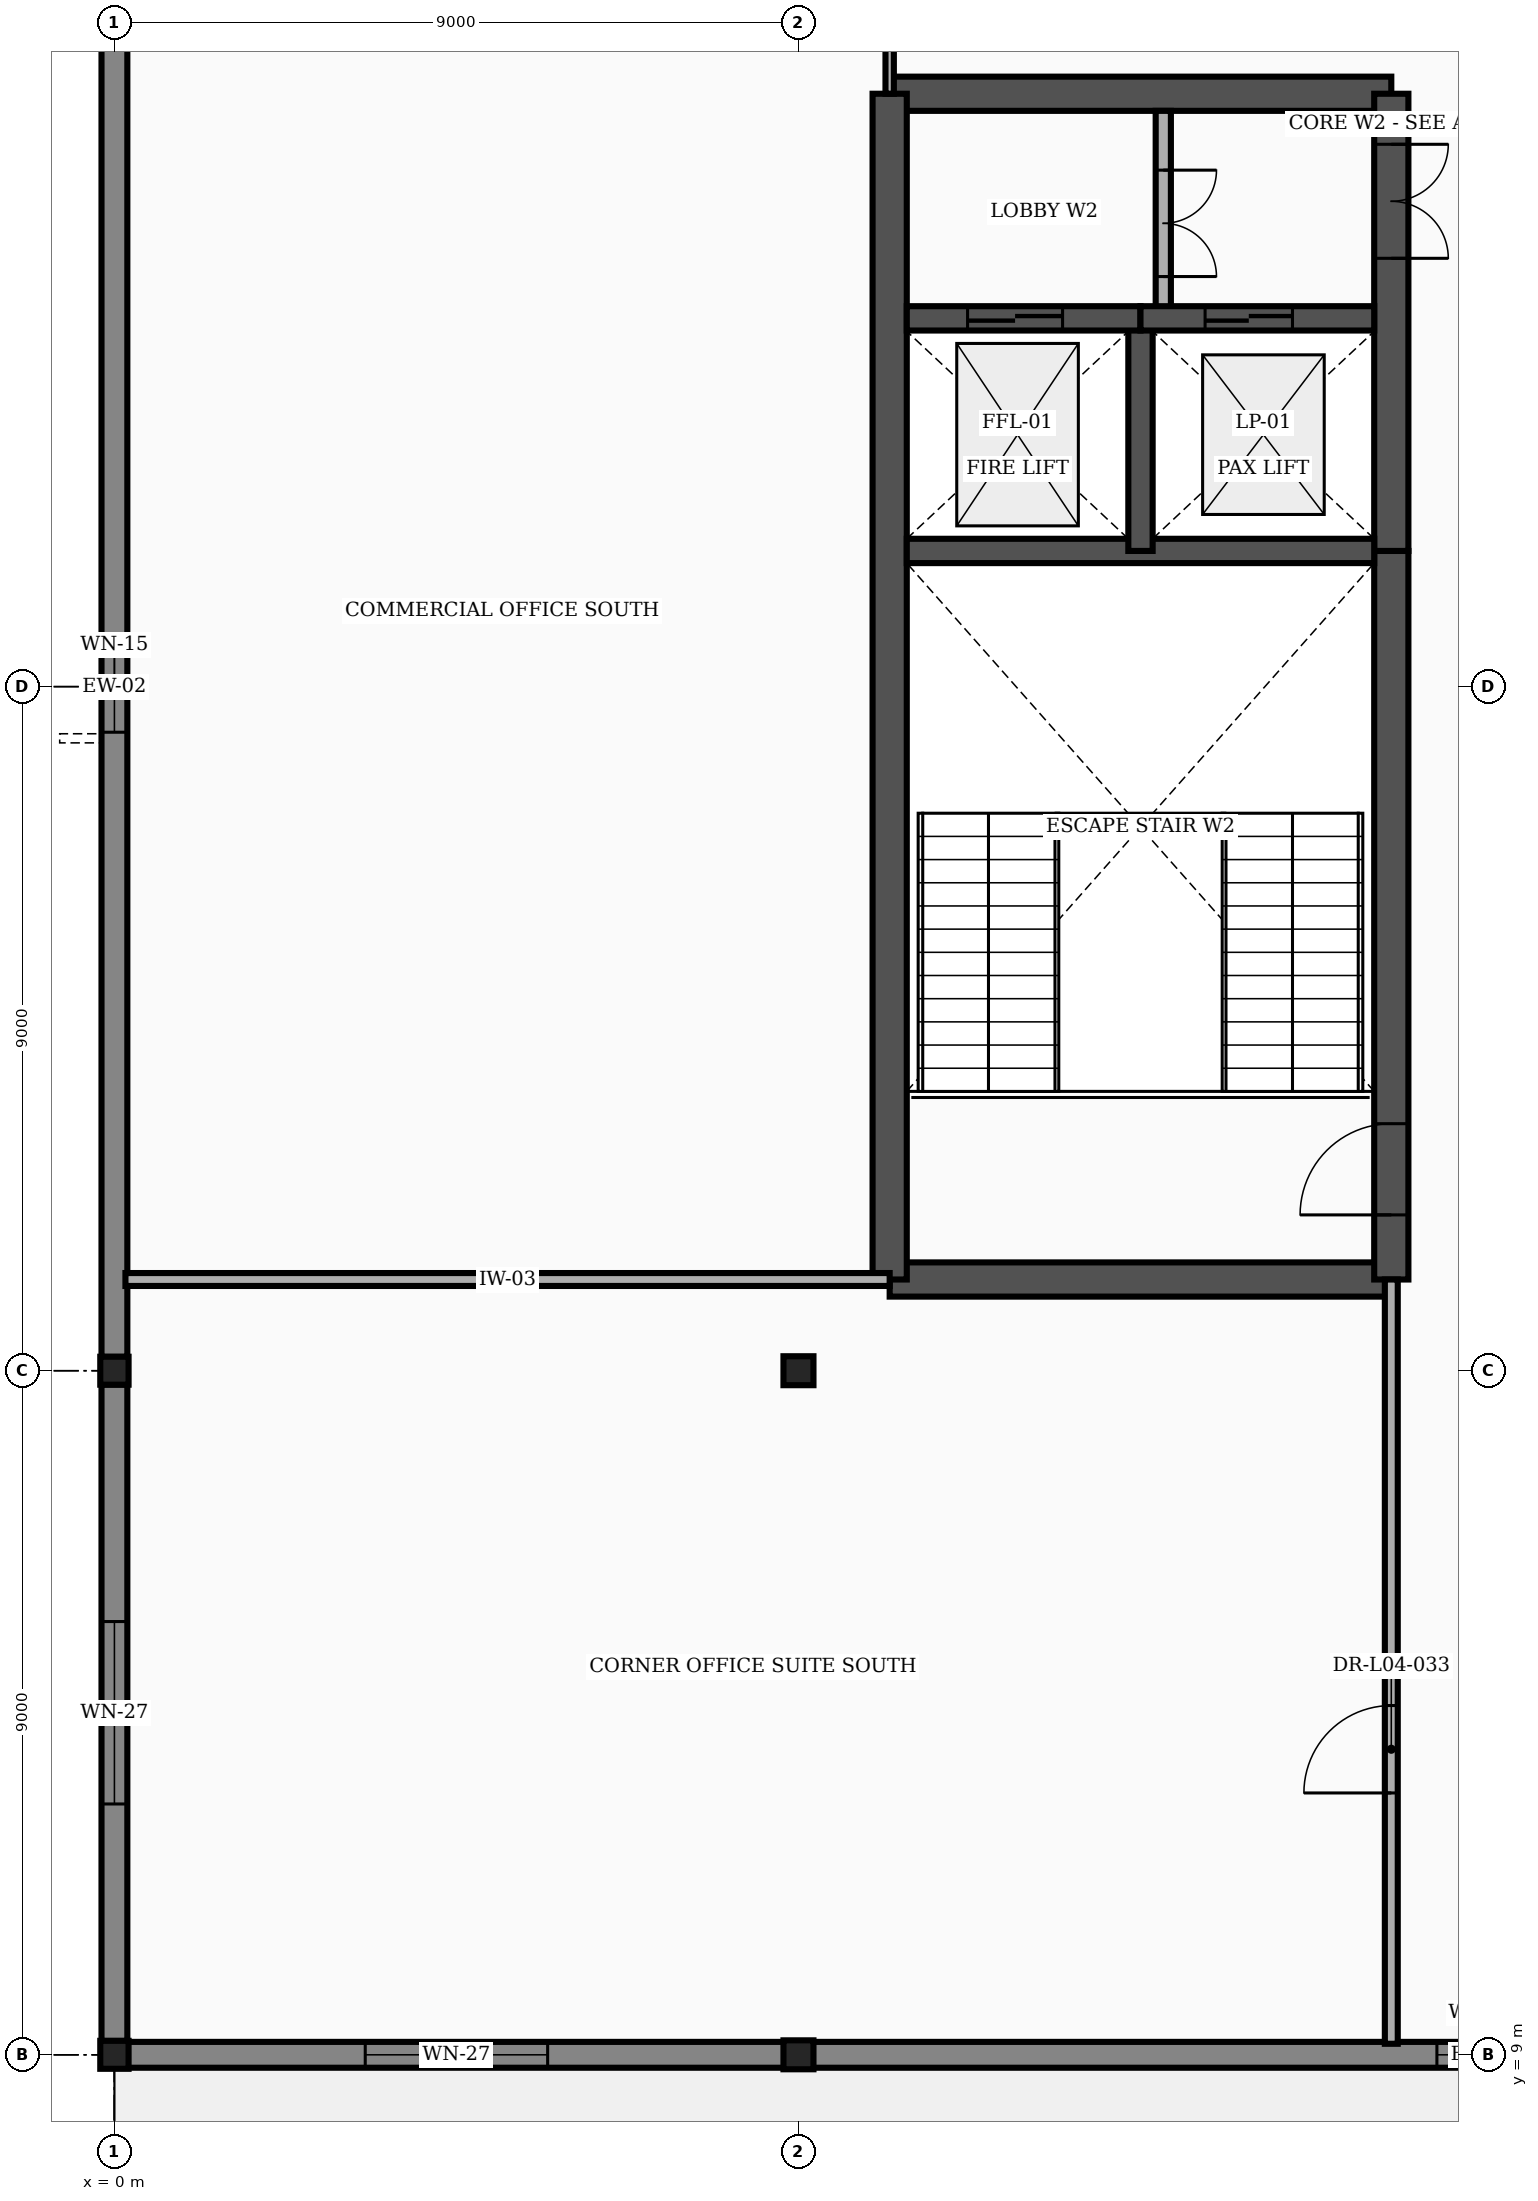
"""IFC4 building model, lengths in metres.
Left out: names, types, materials, properties, quantities, classifications, styles, units other than length and angle.
Written with IfcOpenShell. Run it as: python <this file> out.ifc"""

import sys

from ifc_helpers import new_model, si_unit, direction, frame, frame_2d, origin, origin_2d, place, context, subcontext, project, spatial, rectangle, i_section, extrude, element, fill, save


model = new_model("IFC4")
c1 = context("Model", 3, precision=1e-05, world=origin(), true_north=direction((0.0, 1.0)))
c2 = subcontext(c1, "Body", "Model", "MODEL_VIEW")
j1 = project(units=[si_unit("LENGTHUNIT", "METRE"), si_unit("PLANEANGLEUNIT", "RADIAN")], contexts=[c1])
p1 = place(None, origin())
s1 = spatial("IfcSite", under=j1, at=p1, CompositionType="ELEMENT")
p2 = place(p1, origin())
s2 = spatial("IfcBuilding", under=s1, at=p2, CompositionType="ELEMENT")
p3 = place(p2, frame((0.0, 0.0, 21.6)))
s3 = spatial("IfcBuildingStorey", under=s2, at=p3, CompositionType="ELEMENT", Elevation=21.6)
for number, where, z_axis, x_axis in (
    (1, (0.0, 9.0, 0.0), (0.0, 0.0, 1.0), (1.0, 0.0, 0.0)),
    (2, (0.0, 18.0, 0.0), (0.0, 0.0, 1.0), (1.0, 0.0, 0.0)),
):
    element("IfcColumn", number, at=place(p3, frame(where, z_axis=z_axis, x_axis=x_axis)), inside=s3, PredefinedType="COLUMN", context=c2, shape_type="SweptSolid", body=[
        extrude(i_section(OverallWidth=0.373, OverallDepth=0.368, WebThickness=0.014, FlangeThickness=0.024, FilletRadius=0.015, at=origin_2d()), origin(), (0.0, 0.0, 1.0), 3.9),
    ])
for number, where, z_axis, x_axis in (
    (3, (9.0, 9.0, 0.0), (0.0, 0.0, 1.0), (1.0, 0.0, 0.0)),
    (4, (9.0, 18.0, 0.0), (0.0, 0.0, 1.0), (1.0, 0.0, 0.0)),
):
    element("IfcColumn", number, at=place(p3, frame(where, z_axis=z_axis, x_axis=x_axis)), inside=s3, PredefinedType="COLUMN", context=c2, shape_type="SweptSolid", body=[
        extrude(i_section(OverallWidth=0.395, OverallDepth=0.381, WebThickness=0.018, FlangeThickness=0.03, at=origin_2d()), origin(), (0.0, 0.0, 1.0), 3.9),
    ])
p4 = place(p3, frame((0.01, 9.0, 0.0), z_axis=(0.0, 0.0, 1.0), x_axis=(1.0, 0.0, 0.0)))
e5 = element("IfcWall", 5, at=p4, inside=s3, PredefinedType="STANDARD", context=c2, shape_type="SweptSolid", body=[
    extrude(rectangle(XDim=8.98, YDim=0.34, at=frame_2d((4.49, 0.0))), origin(), (0.0, 0.0, 1.0), 3.585),
])
p5 = place(p4, frame((3.29, 0.0, 0.7)))
e6 = element("IfcOpeningElement", 6, at=p5, cuts=e5, PredefinedType="OPENING", context=c2, shape_type="SweptSolid", body=[
    extrude(rectangle(XDim=2.4, YDim=1.95, at=frame_2d((1.2, 0.975))), frame((0.0, 0.182, 0.0), z_axis=(0.0, -1.0, 0.0), x_axis=(1.0, 0.0, 0.0)), (0.0, 0.0, 1.0), 0.364),
])
p6 = place(p3, frame((9.01, 9.0, 0.0), z_axis=(0.0, 0.0, 1.0), x_axis=(1.0, 0.0, 0.0)))
e7 = element("IfcWall", 7, at=p6, inside=s3, PredefinedType="STANDARD", context=c2, shape_type="SweptSolid", body=[
    extrude(rectangle(XDim=17.98, YDim=0.34, at=frame_2d((8.99, 0.0))), origin(), (0.0, 0.0, 1.0), 3.245),
])
p7 = place(p6, frame((8.39, 0.0, 0.7)))
e8 = element("IfcOpeningElement", 8, at=p7, cuts=e7, PredefinedType="OPENING", context=c2, shape_type="SweptSolid", body=[
    extrude(rectangle(XDim=1.2, YDim=1.95, at=frame_2d((0.6, 0.975))), frame((0.0, 0.182, 0.0), z_axis=(0.0, -1.0, 0.0), x_axis=(1.0, 0.0, 0.0)), (0.0, 0.0, 1.0), 0.364),
])
p8 = place(p3, frame((0.0, 9.182, 0.0), z_axis=(0.0, 0.0, 1.0), x_axis=(0.0, 1.0, 0.0)))
e9 = element("IfcWall", 9, at=p8, inside=s3, PredefinedType="STANDARD", context=c2, shape_type="SweptSolid", body=[
    extrude(rectangle(XDim=8.636, YDim=0.34, at=frame_2d((4.318, 0.0))), origin(), (0.0, 0.0, 1.0), 3.585),
])
p9 = place(p8, frame((3.118, 0.0, 0.7)))
e10 = element("IfcOpeningElement", 10, at=p9, cuts=e9, PredefinedType="OPENING", context=c2, shape_type="SweptSolid", body=[
    extrude(rectangle(XDim=2.4, YDim=1.95, at=frame_2d((1.2, 0.975))), frame((0.0, 0.182, 0.0), z_axis=(0.0, -1.0, 0.0), x_axis=(1.0, 0.0, 0.0)), (0.0, 0.0, 1.0), 0.364),
])
p10 = place(p3, frame((0.0, 18.182, 0.0), z_axis=(0.0, 0.0, 1.0), x_axis=(0.0, 1.0, 0.0)))
e11 = element("IfcWall", 11, at=p10, inside=s3, PredefinedType="STANDARD", context=c2, shape_type="SweptSolid", body=[
    extrude(rectangle(XDim=17.636, YDim=0.34, at=frame_2d((8.818, 0.0))), origin(), (0.0, 0.0, 1.0), 2.973),
])
p11 = place(p10, frame((8.218, 0.0, 0.7)))
e12 = element("IfcOpeningElement", 12, at=p11, cuts=e11, PredefinedType="OPENING", context=c2, shape_type="SweptSolid", body=[
    extrude(rectangle(XDim=1.2, YDim=1.95, at=frame_2d((0.6, 0.975))), frame((0.0, 0.182, 0.0), z_axis=(0.0, -1.0, 0.0), x_axis=(1.0, 0.0, 0.0)), (0.0, 0.0, 1.0), 0.364),
])
for number, where, z_axis, x_axis in (
    (13, (10.2, 19.2, 0.0), (0.0, 0.0, 1.0), (1.0, 0.0, 0.0)),
    (14, (10.2, 34.8, 0.0), (0.0, 0.0, 1.0), (1.0, 0.0, 0.0)),
):
    element("IfcWall", number, at=place(p3, frame(where, z_axis=z_axis, x_axis=x_axis)), inside=s3, PredefinedType="SHEAR", context=c2, shape_type="SweptSolid", body=[
        extrude(rectangle(XDim=6.6, YDim=0.45, at=frame_2d((3.3, 0.0))), origin(), (0.0, 0.0, 1.0), 3.585),
    ])
p12 = place(p3, frame((10.2, 19.2, 0.0), z_axis=(0.0, 0.0, 1.0), x_axis=(0.0, 1.0, 0.0)))
e15 = element("IfcWall", 15, at=p12, inside=s3, PredefinedType="SHEAR", context=c2, shape_type="SweptSolid", body=[
    extrude(rectangle(XDim=15.6, YDim=0.45, at=frame_2d((7.8, 0.0))), origin(), (0.0, 0.0, 1.0), 3.585),
])
p13 = place(p3, frame((16.8, 19.2, 0.0), z_axis=(0.0, 0.0, 1.0), x_axis=(0.0, 1.0, 0.0)))
e16 = element("IfcWall", 16, at=p13, inside=s3, PredefinedType="SHEAR", context=c2, shape_type="SweptSolid", body=[
    extrude(rectangle(XDim=9.585, YDim=0.45, at=frame_2d((4.792, 0.0))), origin(), (0.0, 0.0, 1.0), 3.585),
])
p14 = place(p13, frame((0.85, 0.0, 0.0)))
e17 = element("IfcOpeningElement", 17, at=p14, cuts=e16, PredefinedType="OPENING", context=c2, shape_type="SweptSolid", body=[
    extrude(rectangle(XDim=1.2, YDim=2.2, at=frame_2d((0.6, 1.1))), frame((0.0, 0.237, 0.0), z_axis=(0.0, -1.0, 0.0), x_axis=(1.0, 0.0, 0.0)), (0.0, 0.0, 1.0), 0.474),
])
p15 = place(p3, frame((16.8, 28.785, 0.0), z_axis=(0.0, 0.0, 1.0), x_axis=(0.0, 1.0, 0.0)))
e18 = element("IfcWall", 18, at=p15, inside=s3, PredefinedType="SHEAR", context=c2, shape_type="SweptSolid", body=[
    extrude(rectangle(XDim=6.015, YDim=0.45, at=frame_2d((3.008, 0.0))), origin(), (0.0, 0.0, 1.0), 3.585),
])
p16 = place(p15, frame((3.85, 0.0, 0.0)))
e19 = element("IfcOpeningElement", 19, at=p16, cuts=e18, PredefinedType="OPENING", context=c2, shape_type="SweptSolid", body=[
    extrude(rectangle(XDim=1.5, YDim=2.2, at=frame_2d((0.75, 1.1))), frame((0.0, 0.237, 0.0), z_axis=(0.0, -1.0, 0.0), x_axis=(1.0, 0.0, 0.0)), (0.0, 0.0, 1.0), 0.474),
])
p17 = place(p3, frame((10.425, 28.785, 0.0), z_axis=(0.0, 0.0, 1.0), x_axis=(1.0, 0.0, 0.0)))
e20 = element("IfcWall", 20, at=p17, inside=s3, PredefinedType="SHEAR", context=c2, shape_type="SweptSolid", body=[
    extrude(rectangle(XDim=6.15, YDim=0.32, at=frame_2d((3.075, 0.0))), origin(), (0.0, 0.0, 1.0), 3.585),
])
p18 = place(p3, frame((13.5, 28.785, 0.0), z_axis=(0.0, 0.0, 1.0), x_axis=(0.0, 1.0, 0.0)))
e21 = element("IfcWall", 21, at=p18, inside=s3, PredefinedType="SHEAR", context=c2, shape_type="SweptSolid", body=[
    extrude(rectangle(XDim=3.06, YDim=0.32, at=frame_2d((1.53, 0.0))), origin(), (0.0, 0.0, 1.0), 3.585),
])
p19 = place(p3, frame((13.8, 31.845, 0.0), z_axis=(0.0, 0.0, 1.0), x_axis=(0.0, 1.0, 0.0)))
e22 = element("IfcWall", 22, at=p19, inside=s3, PredefinedType="PARTITIONING", context=c2, shape_type="SweptSolid", body=[
    extrude(rectangle(XDim=2.73, YDim=0.2, at=frame_2d((1.365, 0.0))), origin(), (0.0, 0.0, 1.0), 3.585),
])
p20 = place(p19, frame((0.55, 0.0, 0.0)))
e23 = element("IfcOpeningElement", 23, at=p20, cuts=e22, PredefinedType="OPENING", context=c2, shape_type="SweptSolid", body=[
    extrude(rectangle(XDim=1.4, YDim=2.25, at=frame_2d((0.7, 1.125))), frame((0.0, 0.112, 0.0), z_axis=(0.0, -1.0, 0.0), x_axis=(1.0, 0.0, 0.0)), (0.0, 0.0, 1.0), 0.224),
])
p21 = place(p3, frame((10.425, 31.845, 0.0), z_axis=(0.0, 0.0, 1.0), x_axis=(1.0, 0.0, 0.0)))
e24 = element("IfcWall", 24, at=p21, inside=s3, PredefinedType="SHEAR", context=c2, shape_type="SweptSolid", body=[
    extrude(rectangle(XDim=3.075, YDim=0.32, at=frame_2d((1.538, 0.0))), origin(), (0.0, 0.0, 1.0), 3.585),
])
p22 = place(p21, frame((0.8, 0.0, 0.0)))
e25 = element("IfcOpeningElement", 25, at=p22, cuts=e24, PredefinedType="OPENING", context=c2, shape_type="SweptSolid", body=[
    extrude(rectangle(XDim=1.25, YDim=2.25, at=frame_2d((0.625, 1.125))), frame((0.0, 0.172, 0.0), z_axis=(0.0, -1.0, 0.0), x_axis=(1.0, 0.0, 0.0)), (0.0, 0.0, 1.0), 0.344),
])
p23 = place(p3, frame((13.5, 31.845, 0.0), z_axis=(0.0, 0.0, 1.0), x_axis=(1.0, 0.0, 0.0)))
e26 = element("IfcWall", 26, at=p23, inside=s3, PredefinedType="SHEAR", context=c2, shape_type="SweptSolid", body=[
    extrude(rectangle(XDim=3.075, YDim=0.32, at=frame_2d((1.538, 0.0))), origin(), (0.0, 0.0, 1.0), 3.585),
])
p24 = place(p23, frame((0.85, 0.0, 0.0)))
e27 = element("IfcOpeningElement", 27, at=p24, cuts=e26, PredefinedType="OPENING", context=c2, shape_type="SweptSolid", body=[
    extrude(rectangle(XDim=1.15, YDim=2.2, at=frame_2d((0.575, 1.1))), frame((0.0, 0.172, 0.0), z_axis=(0.0, -1.0, 0.0), x_axis=(1.0, 0.0, 0.0)), (0.0, 0.0, 1.0), 0.344),
])
p25 = place(p3, frame((10.2, 34.8, 0.0), z_axis=(0.0, 0.0, 1.0), x_axis=(0.0, 1.0, 0.0)))
e28 = element("IfcWall", 28, at=p25, inside=s3, PredefinedType="PARTITIONING", context=c2, shape_type="SweptSolid", body=[
    extrude(rectangle(XDim=2.0, YDim=0.11, at=frame_2d((1.0, 0.0))), origin(), (0.0, 0.0, 1.0), 3.585),
])
p26 = place(p3, frame((0.145, 19.2, 0.0), z_axis=(0.0, 0.0, 1.0), x_axis=(1.0, 0.0, 0.0)))
e29 = element("IfcWall", 29, at=p26, inside=s3, PredefinedType="PARTITIONING", context=c2, shape_type="SweptSolid", body=[
    extrude(rectangle(XDim=10.055, YDim=0.17, at=frame_2d((5.027, 0.0))), origin(), (0.0, 0.0, 1.0), 3.585),
])
p27 = place(p3, frame((16.8, 9.145, 0.0), z_axis=(0.0, 0.0, 1.0), x_axis=(0.0, 1.0, 0.0)))
e30 = element("IfcWall", 30, at=p27, inside=s3, PredefinedType="PARTITIONING", context=c2, shape_type="SweptSolid", body=[
    extrude(rectangle(XDim=10.055, YDim=0.17, at=frame_2d((5.027, 0.0))), origin(), (0.0, 0.0, 1.0), 3.585),
])
p28 = place(p27, frame((3.3, 0.0, 0.0)))
e31 = element("IfcOpeningElement", 31, at=p28, cuts=e30, PredefinedType="OPENING", context=c2, shape_type="SweptSolid", body=[
    extrude(rectangle(XDim=1.15, YDim=2.15, at=frame_2d((0.575, 1.075))), frame((0.0, 0.097, 0.0), z_axis=(0.0, -1.0, 0.0), x_axis=(1.0, 0.0, 0.0)), (0.0, 0.0, 1.0), 0.194),
])
p29 = place(p5, origin())
e32 = element("IfcWindow", 32, at=p29, inside=s3, PartitioningType="SINGLE_PANEL", PredefinedType="WINDOW", context=c2, shape_type="SweptSolid", body=[
    extrude(rectangle(XDim=2.4, YDim=1.95, at=frame_2d((1.2, 0.975))), frame((0.0, 0.03, 0.0), z_axis=(0.0, -1.0, 0.0), x_axis=(1.0, 0.0, 0.0)), (0.0, 0.0, 1.0), 0.06),
])
fill(e6, e32)
p30 = place(p7, origin())
e33 = element("IfcWindow", 33, at=p30, inside=s3, PartitioningType="SINGLE_PANEL", PredefinedType="WINDOW", context=c2, shape_type="SweptSolid", body=[
    extrude(rectangle(XDim=1.2, YDim=1.95, at=frame_2d((0.6, 0.975))), frame((0.0, 0.03, 0.0), z_axis=(0.0, -1.0, 0.0), x_axis=(1.0, 0.0, 0.0)), (0.0, 0.0, 1.0), 0.06),
])
fill(e8, e33)
p31 = place(p9, origin())
e34 = element("IfcWindow", 34, at=p31, inside=s3, PartitioningType="SINGLE_PANEL", PredefinedType="WINDOW", context=c2, shape_type="SweptSolid", body=[
    extrude(rectangle(XDim=2.4, YDim=1.95, at=frame_2d((1.2, 0.975))), frame((0.0, 0.03, 0.0), z_axis=(0.0, -1.0, 0.0), x_axis=(1.0, 0.0, 0.0)), (0.0, 0.0, 1.0), 0.06),
])
fill(e10, e34)
p32 = place(p11, origin())
e35 = element("IfcWindow", 35, at=p32, inside=s3, PartitioningType="SINGLE_PANEL", PredefinedType="WINDOW", context=c2, shape_type="SweptSolid", body=[
    extrude(rectangle(XDim=1.2, YDim=1.95, at=frame_2d((0.6, 0.975))), frame((0.0, 0.03, 0.0), z_axis=(0.0, -1.0, 0.0), x_axis=(1.0, 0.0, 0.0)), (0.0, 0.0, 1.0), 0.06),
])
fill(e12, e35)
p33 = place(p14, origin())
e36 = element("IfcDoor", 36, at=p33, inside=s3, OperationType="SINGLE_SWING_LEFT", PredefinedType="DOOR", context=c2, shape_type="SweptSolid", body=[
    extrude(rectangle(XDim=1.2, YDim=2.2, at=frame_2d((0.6, 1.1))), frame((0.0, 0.025, 0.0), z_axis=(0.0, -1.0, 0.0), x_axis=(1.0, 0.0, 0.0)), (0.0, 0.0, 1.0), 0.05),
])
fill(e17, e36)
p34 = place(p16, frame((1.5, 0.0, 0.0), z_axis=(0.0, 0.0, 1.0), x_axis=(-1.0, 0.0, 0.0)))
e37 = element("IfcDoor", 37, at=p34, inside=s3, OperationType="DOUBLE_DOOR_SINGLE_SWING", PredefinedType="DOOR", context=c2, shape_type="SweptSolid", body=[
    extrude(rectangle(XDim=1.5, YDim=2.2, at=frame_2d((0.75, 1.1))), frame((0.0, 0.025, 0.0), z_axis=(0.0, -1.0, 0.0), x_axis=(1.0, 0.0, 0.0)), (0.0, 0.0, 1.0), 0.05),
])
fill(e19, e37)
p35 = place(p20, frame((1.4, 0.0, 0.0), z_axis=(0.0, 0.0, 1.0), x_axis=(-1.0, 0.0, 0.0)))
e38 = element("IfcDoor", 38, at=p35, inside=s3, OperationType="DOUBLE_DOOR_SINGLE_SWING", PredefinedType="DOOR", context=c2, shape_type="SweptSolid", body=[
    extrude(rectangle(XDim=1.4, YDim=2.25, at=frame_2d((0.7, 1.125))), frame((0.0, 0.025, 0.0), z_axis=(0.0, -1.0, 0.0), x_axis=(1.0, 0.0, 0.0)), (0.0, 0.0, 1.0), 0.05),
])
fill(e23, e38)
p36 = place(p22, origin())
e39 = element("IfcDoor", 39, at=p36, inside=s3, OperationType="DOUBLE_DOOR_SLIDING", PredefinedType="DOOR", context=c2, shape_type="SweptSolid", body=[
    extrude(rectangle(XDim=1.25, YDim=2.25, at=frame_2d((0.625, 1.125))), frame((0.0, 0.025, 0.0), z_axis=(0.0, -1.0, 0.0), x_axis=(1.0, 0.0, 0.0)), (0.0, 0.0, 1.0), 0.05),
])
fill(e25, e39)
p37 = place(p24, origin())
e40 = element("IfcDoor", 40, at=p37, inside=s3, OperationType="DOUBLE_DOOR_SLIDING", PredefinedType="DOOR", context=c2, shape_type="SweptSolid", body=[
    extrude(rectangle(XDim=1.15, YDim=2.2, at=frame_2d((0.575, 1.1))), frame((0.0, 0.025, 0.0), z_axis=(0.0, -1.0, 0.0), x_axis=(1.0, 0.0, 0.0)), (0.0, 0.0, 1.0), 0.05),
])
fill(e27, e40)
p38 = place(p28, origin())
e41 = element("IfcDoor", 41, at=p38, inside=s3, OperationType="SINGLE_SWING_LEFT", PredefinedType="DOOR", context=c2, shape_type="SweptSolid", body=[
    extrude(rectangle(XDim=1.15, YDim=2.15, at=frame_2d((0.575, 1.075))), frame((0.0, 0.025, 0.0), z_axis=(0.0, -1.0, 0.0), x_axis=(1.0, 0.0, 0.0)), (0.0, 0.0, 1.0), 0.05),
])
fill(e31, e41)
save(model, sys.argv[1])
